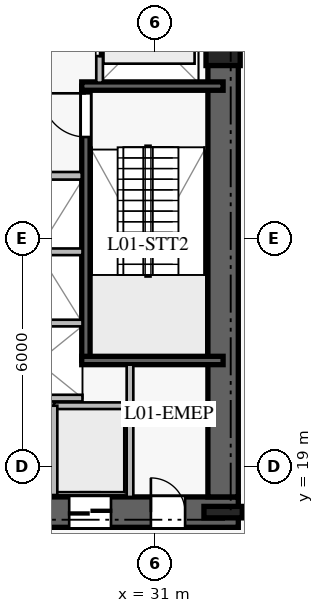
"""IFC4 building model, lengths in metres.
Left out: names, types, materials, properties, quantities, classifications, styles, units other than length and angle.
Written with IfcOpenShell. Run it as: python <this file> out.ifc"""

import sys

from ifc_helpers import new_model, si_unit, direction, frame, frame_2d, origin, origin_2d, place, context, subcontext, project, spatial, rectangle, i_section, extrude, element, fill, save


model = new_model("IFC4")
c1 = context("Model", 3, precision=1e-05, world=origin(), true_north=direction((0.0, 1.0)))
c2 = subcontext(c1, "Body", "Model", "MODEL_VIEW")
j1 = project(units=[si_unit("LENGTHUNIT", "METRE"), si_unit("PLANEANGLEUNIT", "RADIAN")], contexts=[c1])
p1 = place(None, origin())
s1 = spatial("IfcSite", under=j1, at=p1, CompositionType="ELEMENT")
p2 = place(p1, origin())
s2 = spatial("IfcBuilding", under=s1, at=p2, CompositionType="ELEMENT")
p3 = place(p2, frame((0.0, 0.0, 5.2)))
s3 = spatial("IfcBuildingStorey", under=s2, at=p3, CompositionType="ELEMENT", Elevation=5.2)
p4 = place(p3, frame((16.8, 17.8, 0.0), z_axis=(0.0, 0.0, 1.0), x_axis=(1.0, 0.0, 0.0)))
e1 = element("IfcWall", 1, at=p4, inside=s3, PredefinedType="SHEAR", context=c2, shape_type="SweptSolid", body=[
    extrude(rectangle(XDim=16.4, YDim=0.8, at=frame_2d((8.2, 0.0))), origin(), (0.0, 0.0, 1.0), 4.34),
])
p5 = place(p4, frame((5.15, 0.0, 0.0)))
e2 = element("IfcOpeningElement", 2, at=p5, cuts=e1, PredefinedType="OPENING", context=c2, shape_type="SweptSolid", body=[
    extrude(rectangle(XDim=1.2, YDim=2.25, at=frame_2d((0.6, 1.125))), frame((0.0, 0.41, 0.0), z_axis=(0.0, -1.0, 0.0), x_axis=(1.0, 0.0, 0.0)), (0.0, 0.0, 1.0), 0.82),
])
p6 = place(p4, frame((14.1, 0.0, 0.0)))
e3 = element("IfcOpeningElement", 3, at=p6, cuts=e1, PredefinedType="OPENING", context=c2, shape_type="SweptSolid", body=[
    extrude(rectangle(XDim=0.9, YDim=2.1, at=frame_2d((0.45, 1.05))), frame((0.0, 0.41, 0.0), z_axis=(0.0, -1.0, 0.0), x_axis=(1.0, 0.0, 0.0)), (0.0, 0.0, 1.0), 0.82),
])
p7 = place(p4, frame((8.0, 0.0, 0.0)))
e4 = element("IfcOpeningElement", 4, at=p7, cuts=e1, PredefinedType="OPENING", context=c2, shape_type="SweptSolid", body=[
    extrude(rectangle(XDim=1.1, YDim=2.2, at=frame_2d((0.55, 1.1))), frame((0.0, 0.41, 0.0), z_axis=(0.0, -1.0, 0.0), x_axis=(1.0, 0.0, 0.0)), (0.0, 0.0, 1.0), 0.82),
])
p8 = place(p4, frame((9.975, 0.0, 0.0)))
e5 = element("IfcOpeningElement", 5, at=p8, cuts=e1, PredefinedType="OPENING", context=c2, shape_type="SweptSolid", body=[
    extrude(rectangle(XDim=1.1, YDim=2.2, at=frame_2d((0.55, 1.1))), frame((0.0, 0.41, 0.0), z_axis=(0.0, -1.0, 0.0), x_axis=(1.0, 0.0, 0.0)), (0.0, 0.0, 1.0), 0.82),
])
p9 = place(p4, frame((11.95, 0.0, 0.0)))
e6 = element("IfcOpeningElement", 6, at=p9, cuts=e1, PredefinedType="OPENING", context=c2, shape_type="SweptSolid", body=[
    extrude(rectangle(XDim=1.1, YDim=2.2, at=frame_2d((0.55, 1.1))), frame((0.0, 0.41, 0.0), z_axis=(0.0, -1.0, 0.0), x_axis=(1.0, 0.0, 0.0)), (0.0, 0.0, 1.0), 0.82),
])
p10 = place(p3, frame((32.8, 18.2, 0.0), z_axis=(0.0, 0.0, 1.0), x_axis=(0.0, 1.0, 0.0)))
e7 = element("IfcWall", 7, at=p10, inside=s3, PredefinedType="SHEAR", context=c2, shape_type="SweptSolid", body=[
    extrude(rectangle(XDim=13.6, YDim=0.8, at=frame_2d((6.8, 0.0))), origin(), (0.0, 0.0, 1.0), 4.34),
])
p11 = place(p3, frame((32.8, 17.8, 0.0), z_axis=(0.0, 0.0, 1.0), x_axis=(1.0, 0.0, 0.0)))
e8 = element("IfcColumn", 8, at=p11, inside=s3, PredefinedType="COLUMN", context=c2, shape_type="SweptSolid", body=[
    extrude(i_section(OverallWidth=0.302, OverallDepth=1.008, WebThickness=0.021, FlangeThickness=0.04, at=origin_2d()), origin(), (0.0, 0.0, 1.0), 4.6),
])
p12 = place(p3, frame((29.19, 21.79, 0.0), z_axis=(0.0, 0.0, 1.0), x_axis=(0.0, 1.0, 0.0)))
e9 = element("IfcWall", 9, at=p12, inside=s3, PredefinedType="SOLIDWALL", context=c2, shape_type="SweptSolid", body=[
    extrude(rectangle(XDim=7.22, YDim=0.22, at=frame_2d((3.61, 0.0))), origin(), (0.0, 0.0, 1.0), 4.34),
])
p13 = place(p12, frame((5.88, 0.0, 0.0)))
e10 = element("IfcOpeningElement", 10, at=p13, cuts=e9, PredefinedType="OPENING", context=c2, shape_type="SweptSolid", body=[
    extrude(rectangle(XDim=1.15, YDim=2.2, at=frame_2d((0.575, 1.1))), frame((0.0, 0.12, 0.0), z_axis=(0.0, -1.0, 0.0), x_axis=(1.0, 0.0, 0.0)), (0.0, 0.0, 1.0), 0.24),
])
for number, where, z_axis, x_axis in (
    (11, (29.08, 21.79, 0.0), (0.0, 0.0, 1.0), (1.0, 0.0, 0.0)),
    (12, (29.08, 29.01, 0.0), (0.0, 0.0, 1.0), (1.0, 0.0, 0.0)),
):
    element("IfcWall", number, at=place(p3, frame(where, z_axis=z_axis, x_axis=x_axis)), inside=s3, PredefinedType="SOLIDWALL", context=c2, shape_type="SweptSolid", body=[
        extrude(rectangle(XDim=3.72, YDim=0.22, at=frame_2d((1.86, 0.0))), origin(), (0.0, 0.0, 1.0), 4.34),
    ])
p14 = place(p3, frame((32.8, 30.0, 0.0), z_axis=(0.0, 0.0, 1.0), x_axis=(1.0, 0.0, 0.0)))
e13 = element("IfcColumn", 13, at=p14, inside=s3, PredefinedType="PILASTER", context=c2, shape_type="SweptSolid", body=[
    extrude(rectangle(XDim=0.9, YDim=0.9, at=origin_2d()), origin(), (0.0, 0.0, 1.0), 4.6),
])
p15 = place(p3, frame((25.7, 26.65, 0.0), z_axis=(0.0, 0.0, 1.0), x_axis=(1.0, 0.0, 0.0)))
e14 = element("IfcWall", 14, at=p15, inside=s3, PredefinedType="PARTITIONING", context=c2, shape_type="SweptSolid", body=[
    extrude(rectangle(XDim=3.38, YDim=0.2, at=frame_2d((1.69, 0.0))), origin(), (0.0, 0.0, 1.0), 4.34),
])
p16 = place(p3, frame((30.35, 18.2, 0.0), z_axis=(0.0, 0.0, 1.0), x_axis=(0.0, 1.0, 0.0)))
e15 = element("IfcWall", 15, at=p16, inside=s3, PredefinedType="PARTITIONING", context=c2, shape_type="SweptSolid", body=[
    extrude(rectangle(XDim=3.48, YDim=0.175, at=frame_2d((1.74, 0.0))), origin(), (0.0, 0.0, 1.0), 4.34),
])
p17 = place(p3, frame((28.35, 20.6, 0.0), z_axis=(0.0, 0.0, 1.0), x_axis=(1.0, 0.0, 0.0)))
e16 = element("IfcWall", 16, at=p17, inside=s3, PredefinedType="PARTITIONING", context=c2, shape_type="SweptSolid", body=[
    extrude(rectangle(XDim=1.9, YDim=0.175, at=frame_2d((0.95, 0.0))), origin(), (0.0, 0.0, 1.0), 4.34),
])
for number, where, z_axis, x_axis in (
    (17, (28.35, 18.25, 0.0), (0.0, 0.0, 1.0), (0.0, 1.0, 0.0)),
    (18, (26.75, 20.8, 0.0), (0.0, 0.0, 1.0), (1.0, 0.0, 0.0)),
    (19, (26.75, 22.775, 0.0), (0.0, 0.0, 1.0), (1.0, 0.0, 0.0)),
    (20, (26.75, 24.65, 0.0), (0.0, 0.0, 1.0), (1.0, 0.0, 0.0)),
):
    element("IfcWall", number, at=place(p3, frame(where, z_axis=z_axis, x_axis=x_axis)), inside=s3, PredefinedType="PARTITIONING", context=c2, shape_type="SweptSolid", body=[
        extrude(rectangle(XDim=2.35, YDim=0.175, at=frame_2d((1.175, 0.0))), origin(), (0.0, 0.0, 1.0), 4.34),
    ])
p18 = place(p3, frame((29.55, 29.1, 0.0), z_axis=(0.0, 0.0, 1.0), x_axis=(0.0, 1.0, 0.0)))
e21 = element("IfcWall", 21, at=p18, inside=s3, PredefinedType="PARTITIONING", context=c2, shape_type="SweptSolid", body=[
    extrude(rectangle(XDim=2.6, YDim=0.175, at=frame_2d((1.3, 0.0))), origin(), (0.0, 0.0, 1.0), 4.34),
])
p19 = place(p18, frame((0.7, 0.0, 0.0)))
e22 = element("IfcOpeningElement", 22, at=p19, cuts=e21, PredefinedType="OPENING", context=c2, shape_type="SweptSolid", body=[
    extrude(rectangle(XDim=1.2, YDim=2.2, at=frame_2d((0.6, 1.1))), frame((0.0, 0.098, 0.0), z_axis=(0.0, -1.0, 0.0), x_axis=(1.0, 0.0, 0.0)), (0.0, 0.0, 1.0), 0.195),
])
p20 = place(p13, origin())
e23 = element("IfcDoor", 23, at=p20, inside=s3, OperationType="SINGLE_SWING_RIGHT", PredefinedType="DOOR", context=c2, shape_type="SweptSolid", body=[
    extrude(rectangle(XDim=1.15, YDim=2.2, at=frame_2d((0.575, 1.1))), frame((0.0, 0.025, 0.0), z_axis=(0.0, -1.0, 0.0), x_axis=(1.0, 0.0, 0.0)), (0.0, 0.0, 1.0), 0.05),
])
fill(e10, e23)
p21 = place(p6, origin())
e24 = element("IfcDoor", 24, at=p21, inside=s3, OperationType="SINGLE_SWING_LEFT", PredefinedType="DOOR", context=c2, shape_type="SweptSolid", body=[
    extrude(rectangle(XDim=0.9, YDim=2.1, at=frame_2d((0.45, 1.05))), frame((0.0, 0.025, 0.0), z_axis=(0.0, -1.0, 0.0), x_axis=(1.0, 0.0, 0.0)), (0.0, 0.0, 1.0), 0.05),
])
fill(e3, e24)
p22 = place(p9, origin())
e25 = element("IfcDoor", 25, at=p22, inside=s3, OperationType="DOUBLE_DOOR_SLIDING", PredefinedType="DOOR", context=c2, shape_type="SweptSolid", body=[
    extrude(rectangle(XDim=1.1, YDim=2.2, at=frame_2d((0.55, 1.1))), frame((0.0, 0.025, 0.0), z_axis=(0.0, -1.0, 0.0), x_axis=(1.0, 0.0, 0.0)), (0.0, 0.0, 1.0), 0.05),
])
fill(e6, e25)
p23 = place(p19, origin())
e26 = element("IfcDoor", 26, at=p23, inside=s3, OperationType="DOUBLE_DOOR_SLIDING", PredefinedType="DOOR", context=c2, shape_type="SweptSolid", body=[
    extrude(rectangle(XDim=1.2, YDim=2.2, at=frame_2d((0.6, 1.1))), frame((0.0, 0.025, 0.0), z_axis=(0.0, -1.0, 0.0), x_axis=(1.0, 0.0, 0.0)), (0.0, 0.0, 1.0), 0.05),
])
fill(e22, e26)
save(model, sys.argv[1])
